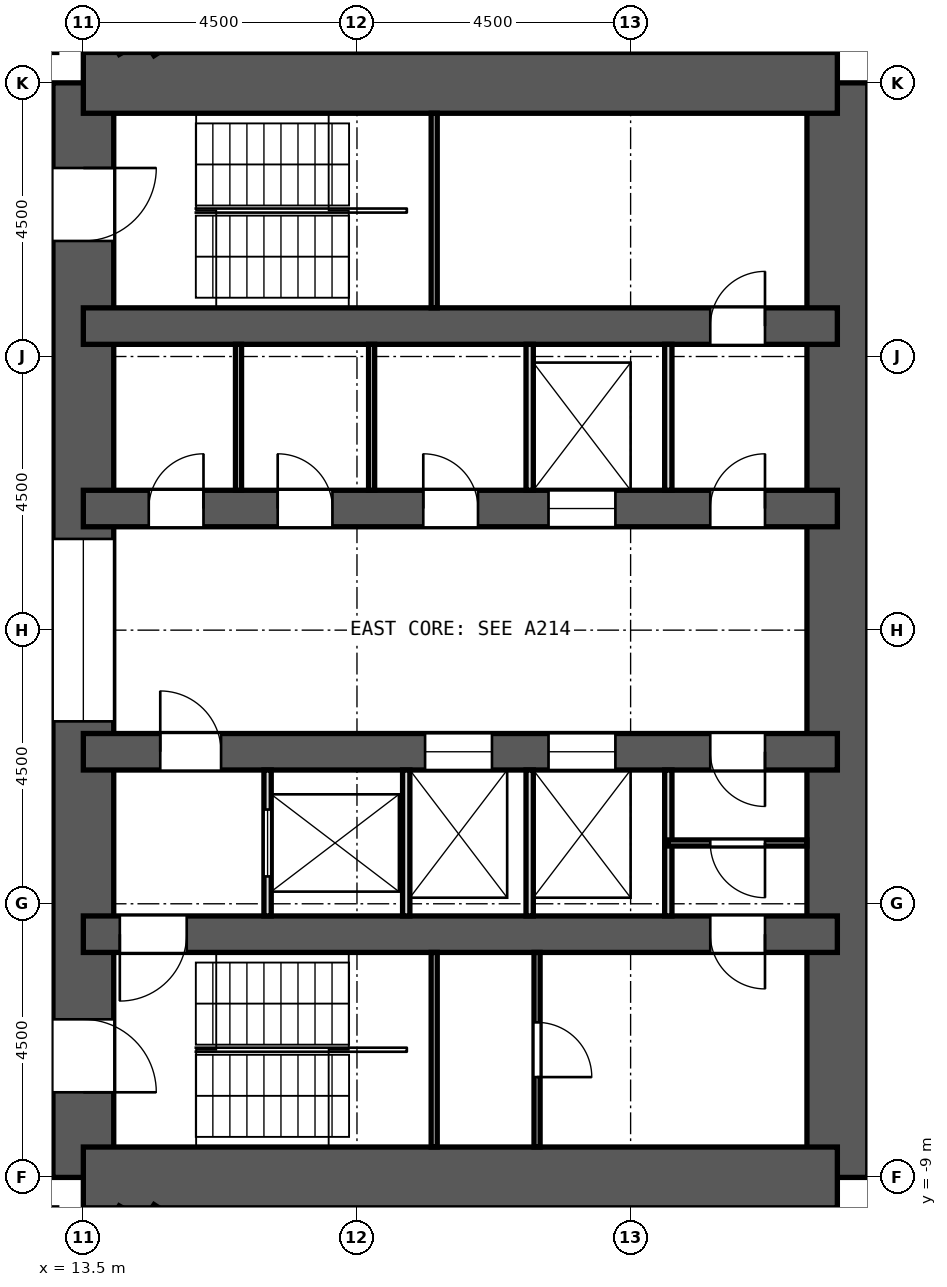
"""IFC4 building model, lengths in metres.
Left out: names, types, materials, properties, quantities, classifications, styles, units other than length and angle.
Written with IfcOpenShell. Run it as: python <this file> out.ifc"""

import sys

from ifc_helpers import new_model, si_unit, direction, frame, frame_2d, origin, place, context, subcontext, project, spatial, rectangle, extrude, element, fill, save


model = new_model("IFC4")
c1 = context("Model", 3, precision=1e-05, world=origin(), true_north=direction((0.0, 1.0)))
c2 = subcontext(c1, "Body", "Model", "MODEL_VIEW")
j1 = project(units=[si_unit("LENGTHUNIT", "METRE"), si_unit("PLANEANGLEUNIT", "RADIAN")], contexts=[c1])
p1 = place(None, origin())
s1 = spatial("IfcSite", under=j1, at=p1, CompositionType="ELEMENT")
p2 = place(p1, origin())
s2 = spatial("IfcBuilding", under=s1, at=p2, CompositionType="ELEMENT")
p3 = place(p2, frame((0.0, 0.0, 75.8)))
s3 = spatial("IfcBuildingStorey", under=s2, at=p3, CompositionType="ELEMENT", Elevation=75.8)
p4 = place(p3, frame((13.5, -9.0, 0.0), z_axis=(0.0, 0.0, 1.0), x_axis=(0.0, 1.0, 0.0)))
e1 = element("IfcWall", 1, at=p4, inside=s3, PredefinedType="SHEAR", context=c2, shape_type="SweptSolid", body=[
    extrude(rectangle(XDim=18.0, YDim=1.0, at=frame_2d((9.0, 0.0))), origin(), (0.0, 0.0, 1.0), 3.3),
])
p5 = place(p4, frame((15.4, 0.0, 0.0)))
e2 = element("IfcOpeningElement", 2, at=p5, cuts=e1, PredefinedType="OPENING", context=c2, shape_type="SweptSolid", body=[
    extrude(rectangle(XDim=1.2, YDim=2.1, at=frame_2d((0.6, 1.05))), frame((0.0, 0.512, 0.0), z_axis=(0.0, -1.0, 0.0), x_axis=(1.0, 0.0, 0.0)), (0.0, 0.0, 1.0), 1.024),
])
p6 = place(p4, frame((1.4, 0.0, 0.0)))
e3 = element("IfcOpeningElement", 3, at=p6, cuts=e1, PredefinedType="OPENING", context=c2, shape_type="SweptSolid", body=[
    extrude(rectangle(XDim=1.2, YDim=2.1, at=frame_2d((0.6, 1.05))), frame((0.0, 0.512, 0.0), z_axis=(0.0, -1.0, 0.0), x_axis=(1.0, 0.0, 0.0)), (0.0, 0.0, 1.0), 1.024),
])
p7 = place(p4, frame((7.5, 0.0, 0.0)))
e4 = element("IfcOpeningElement", 4, at=p7, cuts=e1, PredefinedType="OPENING", context=c2, shape_type="SweptSolid", body=[
    extrude(rectangle(XDim=3.0, YDim=2.4, at=frame_2d((1.5, 1.2))), frame((0.0, 0.512, 0.0), z_axis=(0.0, -1.0, 0.0), x_axis=(1.0, 0.0, 0.0)), (0.0, 0.0, 1.0), 1.024),
])
p8 = place(p3, frame((25.9, -9.0, 0.0), z_axis=(0.0, 0.0, 1.0), x_axis=(0.0, 1.0, 0.0)))
e5 = element("IfcWall", 5, at=p8, inside=s3, PredefinedType="SHEAR", context=c2, shape_type="SweptSolid", body=[
    extrude(rectangle(XDim=18.0, YDim=1.0, at=frame_2d((9.0, 0.0))), origin(), (0.0, 0.0, 1.0), 3.3),
])
for number, where, z_axis, x_axis in (
    (6, (13.5, 9.0, 0.0), (0.0, 0.0, 1.0), (1.0, 0.0, 0.0)),
    (7, (13.5, -9.0, 0.0), (0.0, 0.0, 1.0), (1.0, 0.0, 0.0)),
):
    element("IfcWall", number, at=place(p3, frame(where, z_axis=z_axis, x_axis=x_axis)), inside=s3, PredefinedType="SHEAR", context=c2, shape_type="SweptSolid", body=[
        extrude(rectangle(XDim=12.4, YDim=1.0, at=frame_2d((6.2, 0.0))), origin(), (0.0, 0.0, 1.0), 3.3),
    ])
p9 = place(p3, frame((13.5, 5.0, 0.0), z_axis=(0.0, 0.0, 1.0), x_axis=(1.0, 0.0, 0.0)))
e8 = element("IfcWall", 8, at=p9, inside=s3, PredefinedType="SHEAR", context=c2, shape_type="SweptSolid", body=[
    extrude(rectangle(XDim=12.4, YDim=0.6, at=frame_2d((6.2, 0.0))), origin(), (0.0, 0.0, 1.0), 3.3),
])
p10 = place(p9, frame((10.31, 0.0, 0.0)))
e9 = element("IfcOpeningElement", 9, at=p10, cuts=e8, PredefinedType="OPENING", context=c2, shape_type="SweptSolid", body=[
    extrude(rectangle(XDim=0.9, YDim=2.1, at=frame_2d((0.45, 1.05))), frame((0.0, 0.312, 0.0), z_axis=(0.0, -1.0, 0.0), x_axis=(1.0, 0.0, 0.0)), (0.0, 0.0, 1.0), 0.624),
])
p11 = place(p3, frame((13.5, -5.0, 0.0), z_axis=(0.0, 0.0, 1.0), x_axis=(1.0, 0.0, 0.0)))
e10 = element("IfcWall", 10, at=p11, inside=s3, PredefinedType="SHEAR", context=c2, shape_type="SweptSolid", body=[
    extrude(rectangle(XDim=12.4, YDim=0.6, at=frame_2d((6.2, 0.0))), origin(), (0.0, 0.0, 1.0), 3.3),
])
p12 = place(p11, frame((10.31, 0.0, 0.0)))
e11 = element("IfcOpeningElement", 11, at=p12, cuts=e10, PredefinedType="OPENING", context=c2, shape_type="SweptSolid", body=[
    extrude(rectangle(XDim=0.9, YDim=2.1, at=frame_2d((0.45, 1.05))), frame((0.0, 0.312, 0.0), z_axis=(0.0, -1.0, 0.0), x_axis=(1.0, 0.0, 0.0)), (0.0, 0.0, 1.0), 0.624),
])
p13 = place(p11, frame((0.6, 0.0, 0.0)))
e12 = element("IfcOpeningElement", 12, at=p13, cuts=e10, PredefinedType="OPENING", context=c2, shape_type="SweptSolid", body=[
    extrude(rectangle(XDim=1.1, YDim=2.1, at=frame_2d((0.55, 1.05))), frame((0.0, 0.312, 0.0), z_axis=(0.0, -1.0, 0.0), x_axis=(1.0, 0.0, 0.0)), (0.0, 0.0, 1.0), 0.624),
])
p14 = place(p3, frame((13.5, 2.0, 0.0), z_axis=(0.0, 0.0, 1.0), x_axis=(1.0, 0.0, 0.0)))
e13 = element("IfcWall", 13, at=p14, inside=s3, PredefinedType="SHEAR", context=c2, shape_type="SweptSolid", body=[
    extrude(rectangle(XDim=12.4, YDim=0.6, at=frame_2d((6.2, 0.0))), origin(), (0.0, 0.0, 1.0), 3.3),
])
p15 = place(p14, frame((7.65, 0.0, 0.0)))
e14 = element("IfcOpeningElement", 14, at=p15, cuts=e13, PredefinedType="OPENING", context=c2, shape_type="SweptSolid", body=[
    extrude(rectangle(XDim=1.1, YDim=2.1, at=frame_2d((0.55, 1.05))), frame((0.0, 0.312, 0.0), z_axis=(0.0, -1.0, 0.0), x_axis=(1.0, 0.0, 0.0)), (0.0, 0.0, 1.0), 0.624),
])
p16 = place(p14, frame((1.076, 0.0, 0.0)))
e15 = element("IfcOpeningElement", 15, at=p16, cuts=e13, PredefinedType="OPENING", context=c2, shape_type="SweptSolid", body=[
    extrude(rectangle(XDim=0.9, YDim=2.1, at=frame_2d((0.45, 1.05))), frame((0.0, 0.312, 0.0), z_axis=(0.0, -1.0, 0.0), x_axis=(1.0, 0.0, 0.0)), (0.0, 0.0, 1.0), 0.624),
])
p17 = place(p14, frame((3.196, 0.0, 0.0)))
e16 = element("IfcOpeningElement", 16, at=p17, cuts=e13, PredefinedType="OPENING", context=c2, shape_type="SweptSolid", body=[
    extrude(rectangle(XDim=0.9, YDim=2.1, at=frame_2d((0.45, 1.05))), frame((0.0, 0.312, 0.0), z_axis=(0.0, -1.0, 0.0), x_axis=(1.0, 0.0, 0.0)), (0.0, 0.0, 1.0), 0.624),
])
p18 = place(p14, frame((5.59, 0.0, 0.0)))
e17 = element("IfcOpeningElement", 17, at=p18, cuts=e13, PredefinedType="OPENING", context=c2, shape_type="SweptSolid", body=[
    extrude(rectangle(XDim=0.9, YDim=2.1, at=frame_2d((0.45, 1.05))), frame((0.0, 0.312, 0.0), z_axis=(0.0, -1.0, 0.0), x_axis=(1.0, 0.0, 0.0)), (0.0, 0.0, 1.0), 0.624),
])
p19 = place(p14, frame((10.31, 0.0, 0.0)))
e18 = element("IfcOpeningElement", 18, at=p19, cuts=e13, PredefinedType="OPENING", context=c2, shape_type="SweptSolid", body=[
    extrude(rectangle(XDim=0.9, YDim=2.1, at=frame_2d((0.45, 1.05))), frame((0.0, 0.312, 0.0), z_axis=(0.0, -1.0, 0.0), x_axis=(1.0, 0.0, 0.0)), (0.0, 0.0, 1.0), 0.624),
])
p20 = place(p3, frame((13.5, -2.0, 0.0), z_axis=(0.0, 0.0, 1.0), x_axis=(1.0, 0.0, 0.0)))
e19 = element("IfcWall", 19, at=p20, inside=s3, PredefinedType="SHEAR", context=c2, shape_type="SweptSolid", body=[
    extrude(rectangle(XDim=12.4, YDim=0.6, at=frame_2d((6.2, 0.0))), origin(), (0.0, 0.0, 1.0), 3.3),
])
p21 = place(p20, frame((5.62, 0.0, 0.0)))
e20 = element("IfcOpeningElement", 20, at=p21, cuts=e19, PredefinedType="OPENING", context=c2, shape_type="SweptSolid", body=[
    extrude(rectangle(XDim=1.1, YDim=2.1, at=frame_2d((0.55, 1.05))), frame((0.0, 0.312, 0.0), z_axis=(0.0, -1.0, 0.0), x_axis=(1.0, 0.0, 0.0)), (0.0, 0.0, 1.0), 0.624),
])
p22 = place(p20, frame((7.65, 0.0, 0.0)))
e21 = element("IfcOpeningElement", 21, at=p22, cuts=e19, PredefinedType="OPENING", context=c2, shape_type="SweptSolid", body=[
    extrude(rectangle(XDim=1.1, YDim=2.1, at=frame_2d((0.55, 1.05))), frame((0.0, 0.312, 0.0), z_axis=(0.0, -1.0, 0.0), x_axis=(1.0, 0.0, 0.0)), (0.0, 0.0, 1.0), 0.624),
])
p23 = place(p20, frame((1.265, 0.0, 0.0)))
e22 = element("IfcOpeningElement", 22, at=p23, cuts=e19, PredefinedType="OPENING", context=c2, shape_type="SweptSolid", body=[
    extrude(rectangle(XDim=1.0, YDim=2.1, at=frame_2d((0.5, 1.05))), frame((0.0, 0.312, 0.0), z_axis=(0.0, -1.0, 0.0), x_axis=(1.0, 0.0, 0.0)), (0.0, 0.0, 1.0), 0.624),
])
p24 = place(p20, frame((10.31, 0.0, 0.0)))
e23 = element("IfcOpeningElement", 23, at=p24, cuts=e19, PredefinedType="OPENING", context=c2, shape_type="SweptSolid", body=[
    extrude(rectangle(XDim=0.9, YDim=2.1, at=frame_2d((0.45, 1.05))), frame((0.0, 0.312, 0.0), z_axis=(0.0, -1.0, 0.0), x_axis=(1.0, 0.0, 0.0)), (0.0, 0.0, 1.0), 0.624),
])
for number, where, z_axis, x_axis in (
    (24, (27.523, 7.971, 0.0), (0.0, 0.0, 1.0), (-0.342, 0.94, 0.0)),
    (25, (26.208, -11.585, 0.0), (0.0, 0.0, 1.0), (0.342, 0.94, 0.0)),
):
    element("IfcWall", number, at=place(p3, frame(where, z_axis=z_axis, x_axis=x_axis)), inside=s3, PredefinedType="SOLIDWALL", context=c2, shape_type="SweptSolid", body=[
        extrude(rectangle(XDim=3.846, YDim=0.6, at=frame_2d((1.923, 0.0))), origin(), (0.0, 0.0, 1.0), 2.75),
    ])
p25 = place(p3, frame((13.04, 11.414, 0.0), z_axis=(0.0, 0.0, 1.0), x_axis=(0.500012531179, -0.866018168784, 0.0)))
e26 = element("IfcWall", 26, at=p25, inside=s3, PredefinedType="PARTITIONING", context=c2, shape_type="SweptSolid", body=[
    extrude(rectangle(XDim=2.21, YDim=0.125, at=frame_2d((1.105, 0.0))), origin(), (0.0, 0.0, 1.0), 2.75),
])
p26 = place(p3, frame((14.629, -9.5, 0.0), z_axis=(0.0, 0.0, 1.0), x_axis=(0.838803325008, -0.544434552499, 0.0)))
e27 = element("IfcWall", 27, at=p26, inside=s3, PredefinedType="PARTITIONING", context=c2, shape_type="SweptSolid", body=[
    extrude(rectangle(XDim=1.984, YDim=0.125, at=frame_2d((0.992, 0.0))), origin(), (0.0, 0.0, 1.0), 2.75),
])
p27 = place(p3, frame((14.629, 9.5, 0.0), z_axis=(0.0, 0.0, 1.0), x_axis=(0.838829547553, 0.544394149631, 0.0)))
e28 = element("IfcWall", 28, at=p27, inside=s3, PredefinedType="PARTITIONING", context=c2, shape_type="SweptSolid", body=[
    extrude(rectangle(XDim=1.921, YDim=0.125, at=frame_2d((0.96, 0.0))), origin(), (0.0, 0.0, 1.0), 2.75),
])
p28 = place(p3, frame((13.045, -11.405, 0.0), z_axis=(0.0, 0.0, 1.0), x_axis=(0.500077893725, 0.86598042715, 0.0)))
e29 = element("IfcWall", 29, at=p28, inside=s3, PredefinedType="PARTITIONING", context=c2, shape_type="SweptSolid", body=[
    extrude(rectangle(XDim=2.2, YDim=0.125, at=frame_2d((1.1, 0.0))), origin(), (0.0, 0.0, 1.0), 2.75),
])
for number, where, z_axis, x_axis in (
    (30, (16.052, 2.3, 0.0), (0.0, 0.0, 1.0), (0.0, 1.0, 0.0)),
    (31, (18.241, 2.3, 0.0), (0.0, 0.0, 1.0), (0.0, 1.0, 0.0)),
):
    element("IfcWall", number, at=place(p3, frame(where, z_axis=z_axis, x_axis=x_axis)), inside=s3, PredefinedType="PARTITIONING", context=c2, shape_type="SweptSolid", body=[
        extrude(rectangle(XDim=2.4, YDim=0.1, at=frame_2d((1.2, 0.0))), origin(), (0.0, 0.0, 1.0), 2.75),
    ])
for number, where, z_axis, x_axis in (
    (32, (20.84, 2.3, 0.0), (0.0, 0.0, 1.0), (0.0, 1.0, 0.0)),
    (33, (23.12, 2.3, 0.0), (0.0, 0.0, 1.0), (0.0, 1.0, 0.0)),
):
    element("IfcWall", number, at=place(p3, frame(where, z_axis=z_axis, x_axis=x_axis)), inside=s3, PredefinedType="PARTITIONING", context=c2, shape_type="SweptSolid", body=[
        extrude(rectangle(XDim=2.4, YDim=0.12, at=frame_2d((1.2, 0.0))), origin(), (0.0, 0.0, 1.0), 2.75),
    ])
p29 = place(p3, frame((16.53, -4.7, 0.0), z_axis=(0.0, 0.0, 1.0), x_axis=(0.0, 1.0, 0.0)))
e34 = element("IfcWall", 34, at=p29, inside=s3, PredefinedType="PARTITIONING", context=c2, shape_type="SweptSolid", body=[
    extrude(rectangle(XDim=2.4, YDim=0.12, at=frame_2d((1.2, 0.0))), origin(), (0.0, 0.0, 1.0), 2.75),
])
p30 = place(p29, frame((0.65, 0.0, 0.0)))
e35 = element("IfcOpeningElement", 35, at=p30, cuts=e34, PredefinedType="OPENING", context=c2, shape_type="SweptSolid", body=[
    extrude(rectangle(XDim=1.1, YDim=2.1, at=frame_2d((0.55, 1.05))), frame((0.0, 0.072, 0.0), z_axis=(0.0, -1.0, 0.0), x_axis=(1.0, 0.0, 0.0)), (0.0, 0.0, 1.0), 0.144),
])
for number, where, z_axis, x_axis in (
    (36, (18.81, -4.7, 0.0), (0.0, 0.0, 1.0), (0.0, 1.0, 0.0)),
    (37, (20.84, -4.7, 0.0), (0.0, 0.0, 1.0), (0.0, 1.0, 0.0)),
    (38, (23.12, -4.7, 0.0), (0.0, 0.0, 1.0), (0.0, 1.0, 0.0)),
):
    element("IfcWall", number, at=place(p3, frame(where, z_axis=z_axis, x_axis=x_axis)), inside=s3, PredefinedType="PARTITIONING", context=c2, shape_type="SweptSolid", body=[
        extrude(rectangle(XDim=2.4, YDim=0.12, at=frame_2d((1.2, 0.0))), origin(), (0.0, 0.0, 1.0), 2.75),
    ])
p31 = place(p3, frame((23.12, -3.5, 0.0), z_axis=(0.0, 0.0, 1.0), x_axis=(1.0, 0.0, 0.0)))
e39 = element("IfcWall", 39, at=p31, inside=s3, PredefinedType="PARTITIONING", context=c2, shape_type="SweptSolid", body=[
    extrude(rectangle(XDim=2.28, YDim=0.1, at=frame_2d((1.14, 0.0))), origin(), (0.0, 0.0, 1.0), 2.75),
])
p32 = place(p31, frame((0.69, 0.0, 0.0)))
e40 = element("IfcOpeningElement", 40, at=p32, cuts=e39, PredefinedType="OPENING", context=c2, shape_type="SweptSolid", body=[
    extrude(rectangle(XDim=0.9, YDim=2.1, at=frame_2d((0.45, 1.05))), frame((0.0, 0.062, 0.0), z_axis=(0.0, -1.0, 0.0), x_axis=(1.0, 0.0, 0.0)), (0.0, 0.0, 1.0), 0.124),
])
for number, where, z_axis, x_axis in (
    (41, (19.27, 5.3, 0.0), (0.0, 0.0, 1.0), (0.0, 1.0, 0.0)),
    (42, (19.27, -8.5, 0.0), (0.0, 0.0, 1.0), (0.0, 1.0, 0.0)),
):
    element("IfcWall", number, at=place(p3, frame(where, z_axis=z_axis, x_axis=x_axis)), inside=s3, PredefinedType="PARTITIONING", context=c2, shape_type="SweptSolid", body=[
        extrude(rectangle(XDim=3.2, YDim=0.1, at=frame_2d((1.6, 0.0))), origin(), (0.0, 0.0, 1.0), 2.75),
    ])
p33 = place(p3, frame((20.962, -8.5, 0.0), z_axis=(0.0, 0.0, 1.0), x_axis=(0.0, 1.0, 0.0)))
e43 = element("IfcWall", 43, at=p33, inside=s3, PredefinedType="PARTITIONING", context=c2, shape_type="SweptSolid", body=[
    extrude(rectangle(XDim=3.2, YDim=0.1, at=frame_2d((1.6, 0.0))), origin(), (0.0, 0.0, 1.0), 2.75),
])
p34 = place(p33, frame((1.15, 0.0, 0.0)))
e44 = element("IfcOpeningElement", 44, at=p34, cuts=e43, PredefinedType="OPENING", context=c2, shape_type="SweptSolid", body=[
    extrude(rectangle(XDim=0.9, YDim=2.1, at=frame_2d((0.45, 1.05))), frame((0.0, 0.062, 0.0), z_axis=(0.0, -1.0, 0.0), x_axis=(1.0, 0.0, 0.0)), (0.0, 0.0, 1.0), 0.124),
])
p35 = place(p15, origin())
e45 = element("IfcDoor", 45, at=p35, inside=s3, OperationType="DOUBLE_DOOR_SLIDING", PredefinedType="DOOR", context=c2, shape_type="SweptSolid", body=[
    extrude(rectangle(XDim=1.1, YDim=2.1, at=frame_2d((0.55, 1.05))), frame((0.0, 0.025, 0.0), z_axis=(0.0, -1.0, 0.0), x_axis=(1.0, 0.0, 0.0)), (0.0, 0.0, 1.0), 0.05),
])
fill(e14, e45)
p36 = place(p30, origin())
e46 = element("IfcDoor", 46, at=p36, inside=s3, OperationType="DOUBLE_DOOR_SLIDING", PredefinedType="DOOR", context=c2, shape_type="SweptSolid", body=[
    extrude(rectangle(XDim=1.1, YDim=2.1, at=frame_2d((0.55, 1.05))), frame((0.0, 0.025, 0.0), z_axis=(0.0, -1.0, 0.0), x_axis=(1.0, 0.0, 0.0)), (0.0, 0.0, 1.0), 0.05),
])
fill(e35, e46)
p37 = place(p21, origin())
e47 = element("IfcDoor", 47, at=p37, inside=s3, OperationType="DOUBLE_DOOR_SLIDING", PredefinedType="DOOR", context=c2, shape_type="SweptSolid", body=[
    extrude(rectangle(XDim=1.1, YDim=2.1, at=frame_2d((0.55, 1.05))), frame((0.0, 0.025, 0.0), z_axis=(0.0, -1.0, 0.0), x_axis=(1.0, 0.0, 0.0)), (0.0, 0.0, 1.0), 0.05),
])
fill(e20, e47)
p38 = place(p22, origin())
e48 = element("IfcDoor", 48, at=p38, inside=s3, OperationType="DOUBLE_DOOR_SLIDING", PredefinedType="DOOR", context=c2, shape_type="SweptSolid", body=[
    extrude(rectangle(XDim=1.1, YDim=2.1, at=frame_2d((0.55, 1.05))), frame((0.0, 0.025, 0.0), z_axis=(0.0, -1.0, 0.0), x_axis=(1.0, 0.0, 0.0)), (0.0, 0.0, 1.0), 0.05),
])
fill(e21, e48)
p39 = place(p16, origin())
e49 = element("IfcDoor", 49, at=p39, inside=s3, OperationType="SINGLE_SWING_RIGHT", PredefinedType="DOOR", context=c2, shape_type="SweptSolid", body=[
    extrude(rectangle(XDim=0.9, YDim=2.1, at=frame_2d((0.45, 1.05))), frame((0.0, 0.025, 0.0), z_axis=(0.0, -1.0, 0.0), x_axis=(1.0, 0.0, 0.0)), (0.0, 0.0, 1.0), 0.05),
])
fill(e15, e49)
p40 = place(p17, origin())
e50 = element("IfcDoor", 50, at=p40, inside=s3, OperationType="SINGLE_SWING_LEFT", PredefinedType="DOOR", context=c2, shape_type="SweptSolid", body=[
    extrude(rectangle(XDim=0.9, YDim=2.1, at=frame_2d((0.45, 1.05))), frame((0.0, 0.025, 0.0), z_axis=(0.0, -1.0, 0.0), x_axis=(1.0, 0.0, 0.0)), (0.0, 0.0, 1.0), 0.05),
])
fill(e16, e50)
p41 = place(p18, origin())
e51 = element("IfcDoor", 51, at=p41, inside=s3, OperationType="SINGLE_SWING_LEFT", PredefinedType="DOOR", context=c2, shape_type="SweptSolid", body=[
    extrude(rectangle(XDim=0.9, YDim=2.1, at=frame_2d((0.45, 1.05))), frame((0.0, 0.025, 0.0), z_axis=(0.0, -1.0, 0.0), x_axis=(1.0, 0.0, 0.0)), (0.0, 0.0, 1.0), 0.05),
])
fill(e17, e51)
p42 = place(p19, origin())
e52 = element("IfcDoor", 52, at=p42, inside=s3, OperationType="SINGLE_SWING_RIGHT", PredefinedType="DOOR", context=c2, shape_type="SweptSolid", body=[
    extrude(rectangle(XDim=0.9, YDim=2.1, at=frame_2d((0.45, 1.05))), frame((0.0, 0.025, 0.0), z_axis=(0.0, -1.0, 0.0), x_axis=(1.0, 0.0, 0.0)), (0.0, 0.0, 1.0), 0.05),
])
fill(e18, e52)
p43 = place(p23, origin())
e53 = element("IfcDoor", 53, at=p43, inside=s3, OperationType="SINGLE_SWING_LEFT", PredefinedType="DOOR", context=c2, shape_type="SweptSolid", body=[
    extrude(rectangle(XDim=1.0, YDim=2.1, at=frame_2d((0.5, 1.05))), frame((0.0, 0.025, 0.0), z_axis=(0.0, -1.0, 0.0), x_axis=(1.0, 0.0, 0.0)), (0.0, 0.0, 1.0), 0.05),
])
fill(e22, e53)
p44 = place(p24, frame((0.9, 0.0, 0.0), z_axis=(0.0, 0.0, 1.0), x_axis=(-1.0, 0.0, 0.0)))
e54 = element("IfcDoor", 54, at=p44, inside=s3, OperationType="SINGLE_SWING_LEFT", PredefinedType="DOOR", context=c2, shape_type="SweptSolid", body=[
    extrude(rectangle(XDim=0.9, YDim=2.1, at=frame_2d((0.45, 1.05))), frame((0.0, 0.025, 0.0), z_axis=(0.0, -1.0, 0.0), x_axis=(1.0, 0.0, 0.0)), (0.0, 0.0, 1.0), 0.05),
])
fill(e23, e54)
p45 = place(p10, origin())
e55 = element("IfcDoor", 55, at=p45, inside=s3, OperationType="SINGLE_SWING_RIGHT", PredefinedType="DOOR", context=c2, shape_type="SweptSolid", body=[
    extrude(rectangle(XDim=0.9, YDim=2.1, at=frame_2d((0.45, 1.05))), frame((0.0, 0.025, 0.0), z_axis=(0.0, -1.0, 0.0), x_axis=(1.0, 0.0, 0.0)), (0.0, 0.0, 1.0), 0.05),
])
fill(e9, e55)
p46 = place(p32, frame((0.9, 0.0, 0.0), z_axis=(0.0, 0.0, 1.0), x_axis=(-1.0, 0.0, 0.0)))
e56 = element("IfcDoor", 56, at=p46, inside=s3, OperationType="SINGLE_SWING_LEFT", PredefinedType="DOOR", context=c2, shape_type="SweptSolid", body=[
    extrude(rectangle(XDim=0.9, YDim=2.1, at=frame_2d((0.45, 1.05))), frame((0.0, 0.025, 0.0), z_axis=(0.0, -1.0, 0.0), x_axis=(1.0, 0.0, 0.0)), (0.0, 0.0, 1.0), 0.05),
])
fill(e40, e56)
p47 = place(p34, frame((0.9, 0.0, 0.0), z_axis=(0.0, 0.0, 1.0), x_axis=(-1.0, 0.0, 0.0)))
e57 = element("IfcDoor", 57, at=p47, inside=s3, OperationType="SINGLE_SWING_RIGHT", PredefinedType="DOOR", context=c2, shape_type="SweptSolid", body=[
    extrude(rectangle(XDim=0.9, YDim=2.1, at=frame_2d((0.45, 1.05))), frame((0.0, 0.025, 0.0), z_axis=(0.0, -1.0, 0.0), x_axis=(1.0, 0.0, 0.0)), (0.0, 0.0, 1.0), 0.05),
])
fill(e44, e57)
p48 = place(p12, frame((0.9, 0.0, 0.0), z_axis=(0.0, 0.0, 1.0), x_axis=(-1.0, 0.0, 0.0)))
e58 = element("IfcDoor", 58, at=p48, inside=s3, OperationType="SINGLE_SWING_LEFT", PredefinedType="DOOR", context=c2, shape_type="SweptSolid", body=[
    extrude(rectangle(XDim=0.9, YDim=2.1, at=frame_2d((0.45, 1.05))), frame((0.0, 0.025, 0.0), z_axis=(0.0, -1.0, 0.0), x_axis=(1.0, 0.0, 0.0)), (0.0, 0.0, 1.0), 0.05),
])
fill(e11, e58)
p49 = place(p13, frame((1.1, 0.0, 0.0), z_axis=(0.0, 0.0, 1.0), x_axis=(-1.0, 0.0, 0.0)))
e59 = element("IfcDoor", 59, at=p49, inside=s3, OperationType="SINGLE_SWING_RIGHT", PredefinedType="DOOR", context=c2, shape_type="SweptSolid", body=[
    extrude(rectangle(XDim=1.1, YDim=2.1, at=frame_2d((0.55, 1.05))), frame((0.0, 0.025, 0.0), z_axis=(0.0, -1.0, 0.0), x_axis=(1.0, 0.0, 0.0)), (0.0, 0.0, 1.0), 0.05),
])
fill(e12, e59)
p50 = place(p5, frame((1.2, 0.0, 0.0), z_axis=(0.0, 0.0, 1.0), x_axis=(-1.0, 0.0, 0.0)))
e60 = element("IfcDoor", 60, at=p50, inside=s3, OperationType="SINGLE_SWING_LEFT", PredefinedType="DOOR", context=c2, shape_type="SweptSolid", body=[
    extrude(rectangle(XDim=1.2, YDim=2.1, at=frame_2d((0.6, 1.05))), frame((0.0, 0.025, 0.0), z_axis=(0.0, -1.0, 0.0), x_axis=(1.0, 0.0, 0.0)), (0.0, 0.0, 1.0), 0.05),
])
fill(e2, e60)
p51 = place(p6, frame((1.2, 0.0, 0.0), z_axis=(0.0, 0.0, 1.0), x_axis=(-1.0, 0.0, 0.0)))
e61 = element("IfcDoor", 61, at=p51, inside=s3, OperationType="SINGLE_SWING_RIGHT", PredefinedType="DOOR", context=c2, shape_type="SweptSolid", body=[
    extrude(rectangle(XDim=1.2, YDim=2.1, at=frame_2d((0.6, 1.05))), frame((0.0, 0.025, 0.0), z_axis=(0.0, -1.0, 0.0), x_axis=(1.0, 0.0, 0.0)), (0.0, 0.0, 1.0), 0.05),
])
fill(e3, e61)
p52 = place(p7, origin())
e62 = element("IfcDoor", 62, at=p52, inside=s3, OperationType="DOUBLE_DOOR_SLIDING", PredefinedType="DOOR", context=c2, shape_type="SweptSolid", body=[
    extrude(rectangle(XDim=3.0, YDim=2.4, at=frame_2d((1.5, 1.2))), frame((0.0, 0.025, 0.0), z_axis=(0.0, -1.0, 0.0), x_axis=(1.0, 0.0, 0.0)), (0.0, 0.0, 1.0), 0.05),
])
fill(e4, e62)
save(model, sys.argv[1])
